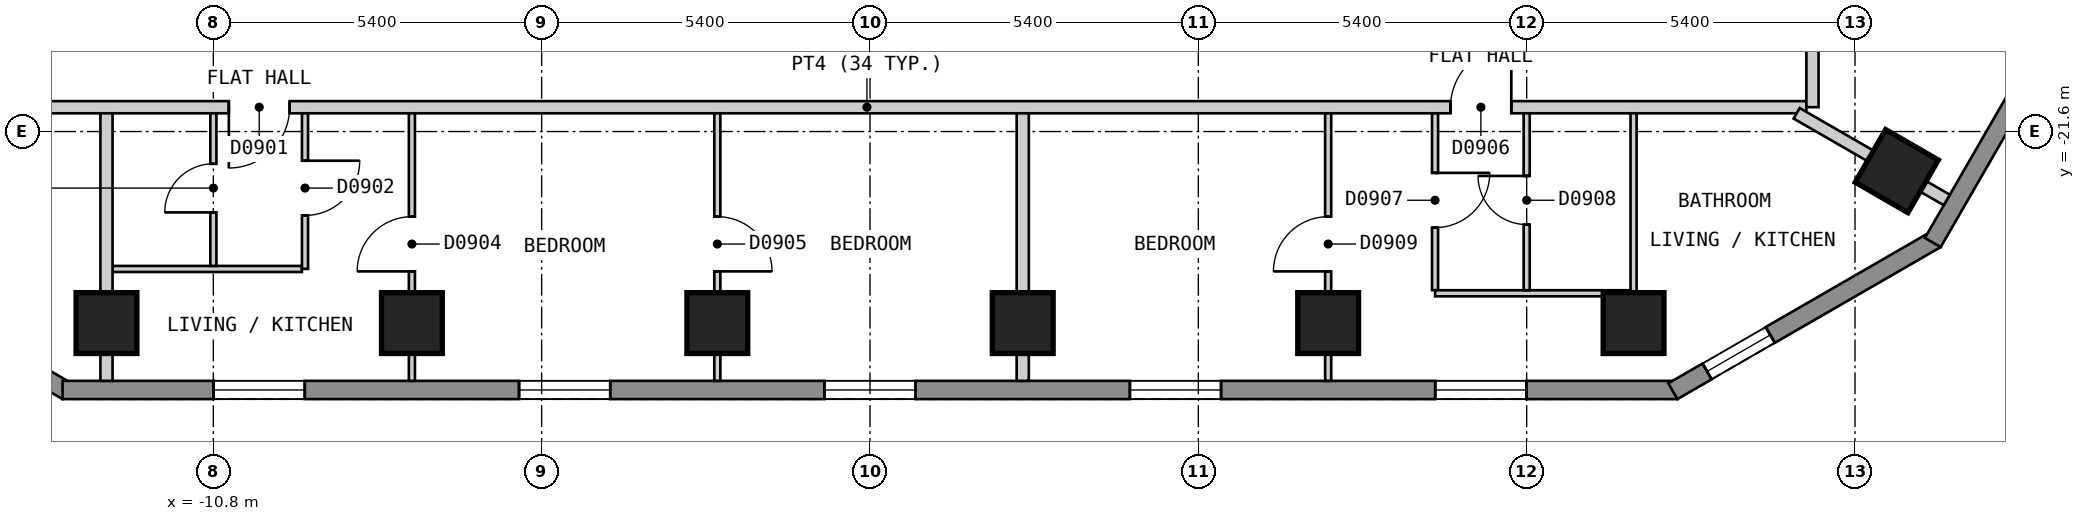
"""IFC4 building model, lengths in metres.
Left out: names, types, materials, properties, quantities, classifications, styles, units other than length and angle.
Written with IfcOpenShell. Run it as: python <this file> out.ifc"""

import sys

from ifc_helpers import new_model, si_unit, direction, frame, frame_2d, origin, origin_2d, place, context, subcontext, project, spatial, polyline, rectangle, outline, extrude, element, fill, save


model = new_model("IFC4")
c1 = context("Model", 3, precision=1e-05, world=origin(), true_north=direction((0.0, 1.0)))
c2 = subcontext(c1, "Body", "Model", "MODEL_VIEW")
j1 = project(units=[si_unit("LENGTHUNIT", "METRE"), si_unit("PLANEANGLEUNIT", "RADIAN")], contexts=[c1])
p1 = place(None, origin())
s1 = spatial("IfcSite", under=j1, at=p1, CompositionType="ELEMENT")
p2 = place(p1, origin())
s2 = spatial("IfcBuilding", under=s1, at=p2, CompositionType="ELEMENT")
p3 = place(p2, frame((0.0, 0.0, 102.0)))
s3 = spatial("IfcBuildingStorey", under=s2, at=p3, CompositionType="ELEMENT", Elevation=102.0)
for number, where, z_axis, x_axis in (
    (1, (-12.557, -24.75, 0.0), (0.0, 0.0, 1.0), (1.0, 0.0, 0.0)),
    (2, (-7.534, -24.75, 0.0), (0.0, 0.0, 1.0), (1.0, 0.0, 0.0)),
    (3, (-2.511, -24.75, 0.0), (0.0, 0.0, 1.0), (1.0, 0.0, 0.0)),
    (4, (2.512, -24.75, 0.0), (0.0, 0.0, 1.0), (1.0, 0.0, 0.0)),
    (5, (7.535, -24.75, 0.0), (0.0, 0.0, 1.0), (1.0, 0.0, 0.0)),
    (6, (12.558, -24.75, 0.0), (0.0, 0.0, 1.0), (1.0, 0.0, 0.0)),
    (7, (16.887, -22.251, 0.0), (0.0, 0.0, 1.0), (0.5, 0.866, 0.0)),
):
    element("IfcColumn", number, at=place(p3, frame(where, z_axis=z_axis, x_axis=x_axis)), inside=s3, PredefinedType="COLUMN", context=c2, shape_type="SweptSolid", body=[
        extrude(rectangle(XDim=1.0, YDim=1.0, at=origin_2d()), origin(), (0.0, 0.0, 1.0), 3.0),
    ])
p4 = place(p3, frame((-17.534, -23.37, 0.0), z_axis=(0.0, 0.0, 1.0), x_axis=(0.866010750942, -0.50002537861, 0.0)))
e8 = element("IfcWall", 8, at=p4, inside=s3, PredefinedType="SOLIDWALL", context=c2, shape_type="SweptSolid", body=[
    extrude(outline(polyline([(0.0, -0.15), (5.0, -0.15), (4.919, 0.15), (0.08, 0.15), (0.0, -0.15)])), origin(), (0.0, 0.0, 1.0), 2.7),
])
p5 = place(p4, frame((0.65, 0.0, 0.15)))
e9 = element("IfcOpeningElement", 9, at=p5, cuts=e8, PredefinedType="OPENING", context=c2, shape_type="SweptSolid", body=[
    extrude(rectangle(XDim=1.2, YDim=2.1, at=frame_2d((0.6, 1.05))), frame((0.0, 0.16, 0.0), z_axis=(0.0, -1.0, 0.0), x_axis=(1.0, 0.0, 0.0)), (0.0, 0.0, 1.0), 0.32),
])
p6 = place(p3, frame((-13.279, -25.85, 0.0), z_axis=(0.0, 0.0, 1.0), x_axis=(1.0, 0.0, 0.0)))
e10 = element("IfcWall", 10, at=p6, inside=s3, PredefinedType="SOLIDWALL", context=c2, shape_type="SweptSolid", body=[
    extrude(outline(polyline([(0.0, -0.15), (26.558, -0.15), (26.478, 0.15), (0.08, 0.15), (0.0, -0.15)])), origin(), (0.0, 0.0, 1.0), 2.7),
])
p7 = place(p6, frame((2.483, 0.0, 0.15)))
e11 = element("IfcOpeningElement", 11, at=p7, cuts=e10, PredefinedType="OPENING", context=c2, shape_type="SweptSolid", body=[
    extrude(rectangle(XDim=1.5, YDim=2.1, at=frame_2d((0.75, 1.05))), frame((0.0, 0.16, 0.0), z_axis=(0.0, -1.0, 0.0), x_axis=(1.0, 0.0, 0.0)), (0.0, 0.0, 1.0), 0.32),
])
p8 = place(p6, frame((7.507, 0.0, 0.15)))
e12 = element("IfcOpeningElement", 12, at=p8, cuts=e10, PredefinedType="OPENING", context=c2, shape_type="SweptSolid", body=[
    extrude(rectangle(XDim=1.5, YDim=2.1, at=frame_2d((0.75, 1.05))), frame((0.0, 0.16, 0.0), z_axis=(0.0, -1.0, 0.0), x_axis=(1.0, 0.0, 0.0)), (0.0, 0.0, 1.0), 0.32),
])
p9 = place(p6, frame((12.529, 0.0, 0.15)))
e13 = element("IfcOpeningElement", 13, at=p9, cuts=e10, PredefinedType="OPENING", context=c2, shape_type="SweptSolid", body=[
    extrude(rectangle(XDim=1.5, YDim=2.1, at=frame_2d((0.75, 1.05))), frame((0.0, 0.16, 0.0), z_axis=(0.0, -1.0, 0.0), x_axis=(1.0, 0.0, 0.0)), (0.0, 0.0, 1.0), 0.32),
])
p10 = place(p6, frame((17.553, 0.0, 0.15)))
e14 = element("IfcOpeningElement", 14, at=p10, cuts=e10, PredefinedType="OPENING", context=c2, shape_type="SweptSolid", body=[
    extrude(rectangle(XDim=1.5, YDim=2.1, at=frame_2d((0.75, 1.05))), frame((0.0, 0.16, 0.0), z_axis=(0.0, -1.0, 0.0), x_axis=(1.0, 0.0, 0.0)), (0.0, 0.0, 1.0), 0.32),
])
p11 = place(p6, frame((22.575, 0.0, 0.15)))
e15 = element("IfcOpeningElement", 15, at=p11, cuts=e10, PredefinedType="OPENING", context=c2, shape_type="SweptSolid", body=[
    extrude(rectangle(XDim=1.5, YDim=2.1, at=frame_2d((0.75, 1.05))), frame((0.0, 0.16, 0.0), z_axis=(0.0, -1.0, 0.0), x_axis=(1.0, 0.0, 0.0)), (0.0, 0.0, 1.0), 0.32),
])
p12 = place(p3, frame((13.204, -25.87, 0.0), z_axis=(0.0, 0.0, 1.0), x_axis=(0.866010750942, 0.50002537861, 0.0)))
e16 = element("IfcWall", 16, at=p12, inside=s3, PredefinedType="SOLIDWALL", context=c2, shape_type="SweptSolid", body=[
    extrude(outline(polyline([(0.0, -0.15), (5.0, -0.15), (4.919, 0.15), (0.08, 0.15), (0.0, -0.15)])), origin(), (0.0, 0.0, 1.0), 2.7),
])
p13 = place(p12, frame((0.65, 0.0, 0.15)))
e17 = element("IfcOpeningElement", 17, at=p13, cuts=e16, PredefinedType="OPENING", context=c2, shape_type="SweptSolid", body=[
    extrude(rectangle(XDim=1.2, YDim=2.1, at=frame_2d((0.6, 1.05))), frame((0.0, 0.16, 0.0), z_axis=(0.0, -1.0, 0.0), x_axis=(1.0, 0.0, 0.0)), (0.0, 0.0, 1.0), 0.32),
])
p14 = place(p3, frame((17.479, -23.425, 0.0), z_axis=(0.0, 0.0, 1.0), x_axis=(0.500035407905, 0.866004960056, 0.0)))
e18 = element("IfcWall", 18, at=p14, inside=s3, PredefinedType="SOLIDWALL", context=c2, shape_type="SweptSolid", body=[
    extrude(outline(polyline([(0.0, -0.15), (23.094, -0.15), (23.014, 0.15), (0.08, 0.15), (0.0, -0.15)])), origin(), (0.0, 0.0, 1.0), 2.7),
])
p15 = place(p14, frame((2.677, 0.0, 0.15)))
e19 = element("IfcOpeningElement", 19, at=p15, cuts=e18, PredefinedType="OPENING", context=c2, shape_type="SweptSolid", body=[
    extrude(rectangle(XDim=1.5, YDim=2.1, at=frame_2d((0.75, 1.05))), frame((0.0, 0.16, 0.0), z_axis=(0.0, -1.0, 0.0), x_axis=(1.0, 0.0, 0.0)), (0.0, 0.0, 1.0), 0.32),
])
p16 = place(p14, frame((8.091, 0.0, 0.15)))
e20 = element("IfcOpeningElement", 20, at=p16, cuts=e18, PredefinedType="OPENING", context=c2, shape_type="SweptSolid", body=[
    extrude(rectangle(XDim=1.5, YDim=2.1, at=frame_2d((0.75, 1.05))), frame((0.0, 0.16, 0.0), z_axis=(0.0, -1.0, 0.0), x_axis=(1.0, 0.0, 0.0)), (0.0, 0.0, 1.0), 0.32),
])
p17 = place(p14, frame((13.504, 0.0, 0.15)))
e21 = element("IfcOpeningElement", 21, at=p17, cuts=e18, PredefinedType="OPENING", context=c2, shape_type="SweptSolid", body=[
    extrude(rectangle(XDim=1.5, YDim=2.1, at=frame_2d((0.75, 1.05))), frame((0.0, 0.16, 0.0), z_axis=(0.0, -1.0, 0.0), x_axis=(1.0, 0.0, 0.0)), (0.0, 0.0, 1.0), 0.32),
])
p18 = place(p14, frame((18.917, 0.0, 0.15)))
e22 = element("IfcOpeningElement", 22, at=p18, cuts=e18, PredefinedType="OPENING", context=c2, shape_type="SweptSolid", body=[
    extrude(rectangle(XDim=1.5, YDim=2.1, at=frame_2d((0.75, 1.05))), frame((0.0, 0.16, 0.0), z_axis=(0.0, -1.0, 0.0), x_axis=(1.0, 0.0, 0.0)), (0.0, 0.0, 1.0), 0.32),
])
p19 = place(p3, frame((-15.499, -21.2, 0.0), z_axis=(0.0, 0.0, 1.0), x_axis=(1.0, 0.0, 0.0)))
e23 = element("IfcWall", 23, at=p19, inside=s3, PredefinedType="PARTITIONING", context=c2, shape_type="SweptSolid", body=[
    extrude(rectangle(XDim=30.898, YDim=0.2, at=frame_2d((15.449, 0.0))), origin(), (0.0, 0.0, 1.0), 2.7),
])
p20 = place(p19, frame((4.954, 0.0, 0.0)))
e24 = element("IfcOpeningElement", 24, at=p20, cuts=e23, PredefinedType="OPENING", context=c2, shape_type="SweptSolid", body=[
    extrude(rectangle(XDim=1.0, YDim=2.1, at=frame_2d((0.5, 1.05))), frame((0.0, 0.11, 0.0), z_axis=(0.0, -1.0, 0.0), x_axis=(1.0, 0.0, 0.0)), (0.0, 0.0, 1.0), 0.22),
])
p21 = place(p19, frame((25.046, 0.0, 0.0)))
e25 = element("IfcOpeningElement", 25, at=p21, cuts=e23, PredefinedType="OPENING", context=c2, shape_type="SweptSolid", body=[
    extrude(rectangle(XDim=1.0, YDim=2.1, at=frame_2d((0.5, 1.05))), frame((0.0, 0.11, 0.0), z_axis=(0.0, -1.0, 0.0), x_axis=(1.0, 0.0, 0.0)), (0.0, 0.0, 1.0), 0.22),
])
p22 = place(p3, frame((15.5, -21.199, 0.0), z_axis=(0.0, 0.0, 1.0), x_axis=(0.0, 1.0, 0.0)))
e26 = element("IfcWall", 26, at=p22, inside=s3, PredefinedType="PARTITIONING", context=c2, shape_type="SweptSolid", body=[
    extrude(rectangle(XDim=5.942, YDim=0.2, at=frame_2d((2.971, 0.0))), origin(), (0.0, 0.0, 1.0), 2.7),
])
p23 = place(p3, frame((-7.534, -21.3, 0.0), z_axis=(0.0, 0.0, 1.0), x_axis=(0.0, -1.0, 0.0)))
e27 = element("IfcWall", 27, at=p23, inside=s3, PredefinedType="PARTITIONING", context=c2, shape_type="SweptSolid", body=[
    extrude(rectangle(XDim=4.4, YDim=0.1, at=frame_2d((2.2, 0.0))), origin(), (0.0, 0.0, 1.0), 2.7),
])
p24 = place(p23, frame((1.7, 0.0, 0.0)))
e28 = element("IfcOpeningElement", 28, at=p24, cuts=e27, PredefinedType="OPENING", context=c2, shape_type="SweptSolid", body=[
    extrude(rectangle(XDim=0.9, YDim=2.1, at=frame_2d((0.45, 1.05))), frame((0.0, 0.06, 0.0), z_axis=(0.0, -1.0, 0.0), x_axis=(1.0, 0.0, 0.0)), (0.0, 0.0, 1.0), 0.12),
])
p25 = place(p3, frame((9.293, -21.3, 0.0), z_axis=(0.0, 0.0, 1.0), x_axis=(0.0, -1.0, 0.0)))
e29 = element("IfcWall", 29, at=p25, inside=s3, PredefinedType="PARTITIONING", context=c2, shape_type="SweptSolid", body=[
    extrude(rectangle(XDim=2.909, YDim=0.1, at=frame_2d((1.455, 0.0))), origin(), (0.0, 0.0, 1.0), 2.7),
])
p26 = place(p25, frame((0.98, 0.0, 0.0)))
e30 = element("IfcOpeningElement", 30, at=p26, cuts=e29, PredefinedType="OPENING", context=c2, shape_type="SweptSolid", body=[
    extrude(rectangle(XDim=0.9, YDim=2.1, at=frame_2d((0.45, 1.05))), frame((0.0, 0.06, 0.0), z_axis=(0.0, -1.0, 0.0), x_axis=(1.0, 0.0, 0.0)), (0.0, 0.0, 1.0), 0.12),
])
p27 = place(p3, frame((-12.457, -23.86, 0.0), z_axis=(0.0, 0.0, 1.0), x_axis=(1.0, 0.0, 0.0)))
e31 = element("IfcWall", 31, at=p27, inside=s3, PredefinedType="PARTITIONING", context=c2, shape_type="SweptSolid", body=[
    extrude(rectangle(XDim=3.114, YDim=0.1, at=frame_2d((1.557, 0.0))), origin(), (0.0, 0.0, 1.0), 2.7),
])
p28 = place(p3, frame((9.294, -24.26, 0.0), z_axis=(0.0, 0.0, 1.0), x_axis=(1.0, 0.0, 0.0)))
e32 = element("IfcWall", 32, at=p28, inside=s3, PredefinedType="PARTITIONING", context=c2, shape_type="SweptSolid", body=[
    extrude(rectangle(XDim=3.213, YDim=0.1, at=frame_2d((1.606, 0.0))), origin(), (0.0, 0.0, 1.0), 2.7),
])
p29 = place(p3, frame((7.535, -25.7, 0.0), z_axis=(0.0, 0.0, 1.0), x_axis=(0.0, 1.0, 0.0)))
e33 = element("IfcWall", 33, at=p29, inside=s3, PredefinedType="PARTITIONING", context=c2, shape_type="SweptSolid", body=[
    extrude(rectangle(XDim=4.4, YDim=0.1, at=frame_2d((2.2, 0.0))), origin(), (0.0, 0.0, 1.0), 2.7),
])
p30 = place(p29, frame((1.8, 0.0, 0.0)))
e34 = element("IfcOpeningElement", 34, at=p30, cuts=e33, PredefinedType="OPENING", context=c2, shape_type="SweptSolid", body=[
    extrude(rectangle(XDim=0.9, YDim=2.1, at=frame_2d((0.45, 1.05))), frame((0.0, 0.06, 0.0), z_axis=(0.0, -1.0, 0.0), x_axis=(1.0, 0.0, 0.0)), (0.0, 0.0, 1.0), 0.12),
])
p31 = place(p3, frame((10.8, -24.21, 0.0), z_axis=(0.0, 0.0, 1.0), x_axis=(0.0, 1.0, 0.0)))
e35 = element("IfcWall", 35, at=p31, inside=s3, PredefinedType="PARTITIONING", context=c2, shape_type="SweptSolid", body=[
    extrude(rectangle(XDim=2.91, YDim=0.1, at=frame_2d((1.455, 0.0))), origin(), (0.0, 0.0, 1.0), 2.7),
])
p32 = place(p31, frame((1.08, 0.0, 0.0)))
e36 = element("IfcOpeningElement", 36, at=p32, cuts=e35, PredefinedType="OPENING", context=c2, shape_type="SweptSolid", body=[
    extrude(rectangle(XDim=0.8, YDim=2.1, at=frame_2d((0.4, 1.05))), frame((0.0, 0.06, 0.0), z_axis=(0.0, -1.0, 0.0), x_axis=(1.0, 0.0, 0.0)), (0.0, 0.0, 1.0), 0.12),
])
p33 = place(p3, frame((12.558, -24.259, 0.0), z_axis=(0.0, 0.0, 1.0), x_axis=(0.0, 1.0, 0.0)))
e37 = element("IfcWall", 37, at=p33, inside=s3, PredefinedType="PARTITIONING", context=c2, shape_type="SweptSolid", body=[
    extrude(rectangle(XDim=2.959, YDim=0.1, at=frame_2d((1.479, 0.0))), origin(), (0.0, 0.0, 1.0), 2.7),
])
p34 = place(p3, frame((-9.292, -23.859, 0.0), z_axis=(0.0, 0.0, 1.0), x_axis=(0.0, 1.0, 0.0)))
e38 = element("IfcWall", 38, at=p34, inside=s3, PredefinedType="PARTITIONING", context=c2, shape_type="SweptSolid", body=[
    extrude(rectangle(XDim=2.559, YDim=0.1, at=frame_2d((1.279, 0.0))), origin(), (0.0, 0.0, 1.0), 2.7),
])
p35 = place(p34, frame((0.879, 0.0, 0.0)))
e39 = element("IfcOpeningElement", 39, at=p35, cuts=e38, PredefinedType="OPENING", context=c2, shape_type="SweptSolid", body=[
    extrude(rectangle(XDim=0.9, YDim=2.1, at=frame_2d((0.45, 1.05))), frame((0.0, 0.06, 0.0), z_axis=(0.0, -1.0, 0.0), x_axis=(1.0, 0.0, 0.0)), (0.0, 0.0, 1.0), 0.12),
])
p36 = place(p3, frame((-10.799, -23.81, 0.0), z_axis=(0.0, 0.0, 1.0), x_axis=(0.0, 1.0, 0.0)))
e40 = element("IfcWall", 40, at=p36, inside=s3, PredefinedType="PARTITIONING", context=c2, shape_type="SweptSolid", body=[
    extrude(rectangle(XDim=2.51, YDim=0.1, at=frame_2d((1.255, 0.0))), origin(), (0.0, 0.0, 1.0), 2.7),
])
p37 = place(p36, frame((0.88, 0.0, 0.0)))
e41 = element("IfcOpeningElement", 41, at=p37, cuts=e40, PredefinedType="OPENING", context=c2, shape_type="SweptSolid", body=[
    extrude(rectangle(XDim=0.8, YDim=2.1, at=frame_2d((0.4, 1.05))), frame((0.0, 0.06, 0.0), z_axis=(0.0, -1.0, 0.0), x_axis=(1.0, 0.0, 0.0)), (0.0, 0.0, 1.0), 0.12),
])
p38 = place(p3, frame((-2.511, -25.7, 0.0), z_axis=(0.0, 0.0, 1.0), x_axis=(0.0, 1.0, 0.0)))
e42 = element("IfcWall", 42, at=p38, inside=s3, PredefinedType="PARTITIONING", context=c2, shape_type="SweptSolid", body=[
    extrude(rectangle(XDim=4.4, YDim=0.1, at=frame_2d((2.2, 0.0))), origin(), (0.0, 0.0, 1.0), 2.7),
])
p39 = place(p38, frame((1.8, 0.0, 0.0)))
e43 = element("IfcOpeningElement", 43, at=p39, cuts=e42, PredefinedType="OPENING", context=c2, shape_type="SweptSolid", body=[
    extrude(rectangle(XDim=0.9, YDim=2.1, at=frame_2d((0.45, 1.05))), frame((0.0, 0.06, 0.0), z_axis=(0.0, -1.0, 0.0), x_axis=(1.0, 0.0, 0.0)), (0.0, 0.0, 1.0), 0.12),
])
p40 = place(p3, frame((15.24, -21.3, 0.0), z_axis=(0.0, 0.0, 1.0), x_axis=(0.866090043625, -0.499888023795, 0.0)))
e44 = element("IfcWall", 44, at=p40, inside=s3, PredefinedType="PARTITIONING", context=c2, shape_type="SweptSolid", body=[
    extrude(rectangle(XDim=2.851, YDim=0.2, at=frame_2d((1.425, 0.0))), origin(), (0.0, 0.0, 1.0), 2.7),
])
for number, where, z_axis, x_axis in (
    (45, (2.512, -25.7, 0.0), (0.0, 0.0, 1.0), (0.0, 1.0, 0.0)),
    (46, (-12.557, -25.7, 0.0), (0.0, 0.0, 1.0), (0.0, 1.0, 0.0)),
):
    element("IfcWall", number, at=place(p3, frame(where, z_axis=z_axis, x_axis=x_axis)), inside=s3, PredefinedType="PARTITIONING", context=c2, shape_type="SweptSolid", body=[
        extrude(rectangle(XDim=4.4, YDim=0.2, at=frame_2d((2.2, 0.0))), origin(), (0.0, 0.0, 1.0), 2.7),
    ])
p41 = place(p7, origin())
e47 = element("IfcWindow", 47, at=p41, inside=s3, PartitioningType="SINGLE_PANEL", PredefinedType="WINDOW", context=c2, shape_type="SweptSolid", body=[
    extrude(rectangle(XDim=1.5, YDim=2.1, at=frame_2d((0.75, 1.05))), frame((0.0, 0.03, 0.0), z_axis=(0.0, -1.0, 0.0), x_axis=(1.0, 0.0, 0.0)), (0.0, 0.0, 1.0), 0.06),
])
fill(e11, e47)
p42 = place(p8, origin())
e48 = element("IfcWindow", 48, at=p42, inside=s3, PartitioningType="SINGLE_PANEL", PredefinedType="WINDOW", context=c2, shape_type="SweptSolid", body=[
    extrude(rectangle(XDim=1.5, YDim=2.1, at=frame_2d((0.75, 1.05))), frame((0.0, 0.03, 0.0), z_axis=(0.0, -1.0, 0.0), x_axis=(1.0, 0.0, 0.0)), (0.0, 0.0, 1.0), 0.06),
])
fill(e12, e48)
p43 = place(p9, origin())
e49 = element("IfcWindow", 49, at=p43, inside=s3, PartitioningType="SINGLE_PANEL", PredefinedType="WINDOW", context=c2, shape_type="SweptSolid", body=[
    extrude(rectangle(XDim=1.5, YDim=2.1, at=frame_2d((0.75, 1.05))), frame((0.0, 0.03, 0.0), z_axis=(0.0, -1.0, 0.0), x_axis=(1.0, 0.0, 0.0)), (0.0, 0.0, 1.0), 0.06),
])
fill(e13, e49)
p44 = place(p10, origin())
e50 = element("IfcWindow", 50, at=p44, inside=s3, PartitioningType="SINGLE_PANEL", PredefinedType="WINDOW", context=c2, shape_type="SweptSolid", body=[
    extrude(rectangle(XDim=1.5, YDim=2.1, at=frame_2d((0.75, 1.05))), frame((0.0, 0.03, 0.0), z_axis=(0.0, -1.0, 0.0), x_axis=(1.0, 0.0, 0.0)), (0.0, 0.0, 1.0), 0.06),
])
fill(e14, e50)
p45 = place(p11, origin())
e51 = element("IfcWindow", 51, at=p45, inside=s3, PartitioningType="SINGLE_PANEL", PredefinedType="WINDOW", context=c2, shape_type="SweptSolid", body=[
    extrude(rectangle(XDim=1.5, YDim=2.1, at=frame_2d((0.75, 1.05))), frame((0.0, 0.03, 0.0), z_axis=(0.0, -1.0, 0.0), x_axis=(1.0, 0.0, 0.0)), (0.0, 0.0, 1.0), 0.06),
])
fill(e15, e51)
p46 = place(p13, origin())
e52 = element("IfcWindow", 52, at=p46, inside=s3, PartitioningType="SINGLE_PANEL", PredefinedType="WINDOW", context=c2, shape_type="SweptSolid", body=[
    extrude(rectangle(XDim=1.2, YDim=2.1, at=frame_2d((0.6, 1.05))), frame((0.0, 0.03, 0.0), z_axis=(0.0, -1.0, 0.0), x_axis=(1.0, 0.0, 0.0)), (0.0, 0.0, 1.0), 0.06),
])
fill(e17, e52)
p47 = place(p20, origin())
e53 = element("IfcDoor", 53, at=p47, inside=s3, OperationType="SINGLE_SWING_LEFT", PredefinedType="DOOR", context=c2, shape_type="SweptSolid", body=[
    extrude(rectangle(XDim=1.0, YDim=2.1, at=frame_2d((0.5, 1.05))), frame((0.0, 0.025, 0.0), z_axis=(0.0, -1.0, 0.0), x_axis=(1.0, 0.0, 0.0)), (0.0, 0.0, 1.0), 0.05),
])
fill(e24, e53)
p48 = place(p35, origin())
e54 = element("IfcDoor", 54, at=p48, inside=s3, OperationType="SINGLE_SWING_RIGHT", PredefinedType="DOOR", context=c2, shape_type="SweptSolid", body=[
    extrude(rectangle(XDim=0.9, YDim=2.1, at=frame_2d((0.45, 1.05))), frame((0.0, 0.025, 0.0), z_axis=(0.0, -1.0, 0.0), x_axis=(1.0, 0.0, 0.0)), (0.0, 0.0, 1.0), 0.05),
])
fill(e39, e54)
p49 = place(p37, origin())
e55 = element("IfcDoor", 55, at=p49, inside=s3, OperationType="SINGLE_SWING_LEFT", PredefinedType="DOOR", context=c2, shape_type="SweptSolid", body=[
    extrude(rectangle(XDim=0.8, YDim=2.1, at=frame_2d((0.4, 1.05))), frame((0.0, 0.025, 0.0), z_axis=(0.0, -1.0, 0.0), x_axis=(1.0, 0.0, 0.0)), (0.0, 0.0, 1.0), 0.05),
])
fill(e41, e55)
p50 = place(p24, origin())
e56 = element("IfcDoor", 56, at=p50, inside=s3, OperationType="SINGLE_SWING_RIGHT", PredefinedType="DOOR", context=c2, shape_type="SweptSolid", body=[
    extrude(rectangle(XDim=0.9, YDim=2.1, at=frame_2d((0.45, 1.05))), frame((0.0, 0.025, 0.0), z_axis=(0.0, -1.0, 0.0), x_axis=(1.0, 0.0, 0.0)), (0.0, 0.0, 1.0), 0.05),
])
fill(e28, e56)
p51 = place(p39, origin())
e57 = element("IfcDoor", 57, at=p51, inside=s3, OperationType="SINGLE_SWING_LEFT", PredefinedType="DOOR", context=c2, shape_type="SweptSolid", body=[
    extrude(rectangle(XDim=0.9, YDim=2.1, at=frame_2d((0.45, 1.05))), frame((0.0, 0.025, 0.0), z_axis=(0.0, -1.0, 0.0), x_axis=(1.0, 0.0, 0.0)), (0.0, 0.0, 1.0), 0.05),
])
fill(e43, e57)
p52 = place(p21, origin())
e58 = element("IfcDoor", 58, at=p52, inside=s3, OperationType="SINGLE_SWING_RIGHT", PredefinedType="DOOR", context=c2, shape_type="SweptSolid", body=[
    extrude(rectangle(XDim=1.0, YDim=2.1, at=frame_2d((0.5, 1.05))), frame((0.0, 0.025, 0.0), z_axis=(0.0, -1.0, 0.0), x_axis=(1.0, 0.0, 0.0)), (0.0, 0.0, 1.0), 0.05),
])
fill(e25, e58)
p53 = place(p26, origin())
e59 = element("IfcDoor", 59, at=p53, inside=s3, OperationType="SINGLE_SWING_LEFT", PredefinedType="DOOR", context=c2, shape_type="SweptSolid", body=[
    extrude(rectangle(XDim=0.9, YDim=2.1, at=frame_2d((0.45, 1.05))), frame((0.0, 0.025, 0.0), z_axis=(0.0, -1.0, 0.0), x_axis=(1.0, 0.0, 0.0)), (0.0, 0.0, 1.0), 0.05),
])
fill(e30, e59)
p54 = place(p32, origin())
e60 = element("IfcDoor", 60, at=p54, inside=s3, OperationType="SINGLE_SWING_RIGHT", PredefinedType="DOOR", context=c2, shape_type="SweptSolid", body=[
    extrude(rectangle(XDim=0.8, YDim=2.1, at=frame_2d((0.4, 1.05))), frame((0.0, 0.025, 0.0), z_axis=(0.0, -1.0, 0.0), x_axis=(1.0, 0.0, 0.0)), (0.0, 0.0, 1.0), 0.05),
])
fill(e36, e60)
p55 = place(p30, origin())
e61 = element("IfcDoor", 61, at=p55, inside=s3, OperationType="SINGLE_SWING_LEFT", PredefinedType="DOOR", context=c2, shape_type="SweptSolid", body=[
    extrude(rectangle(XDim=0.9, YDim=2.1, at=frame_2d((0.45, 1.05))), frame((0.0, 0.025, 0.0), z_axis=(0.0, -1.0, 0.0), x_axis=(1.0, 0.0, 0.0)), (0.0, 0.0, 1.0), 0.05),
])
fill(e34, e61)
save(model, sys.argv[1])
